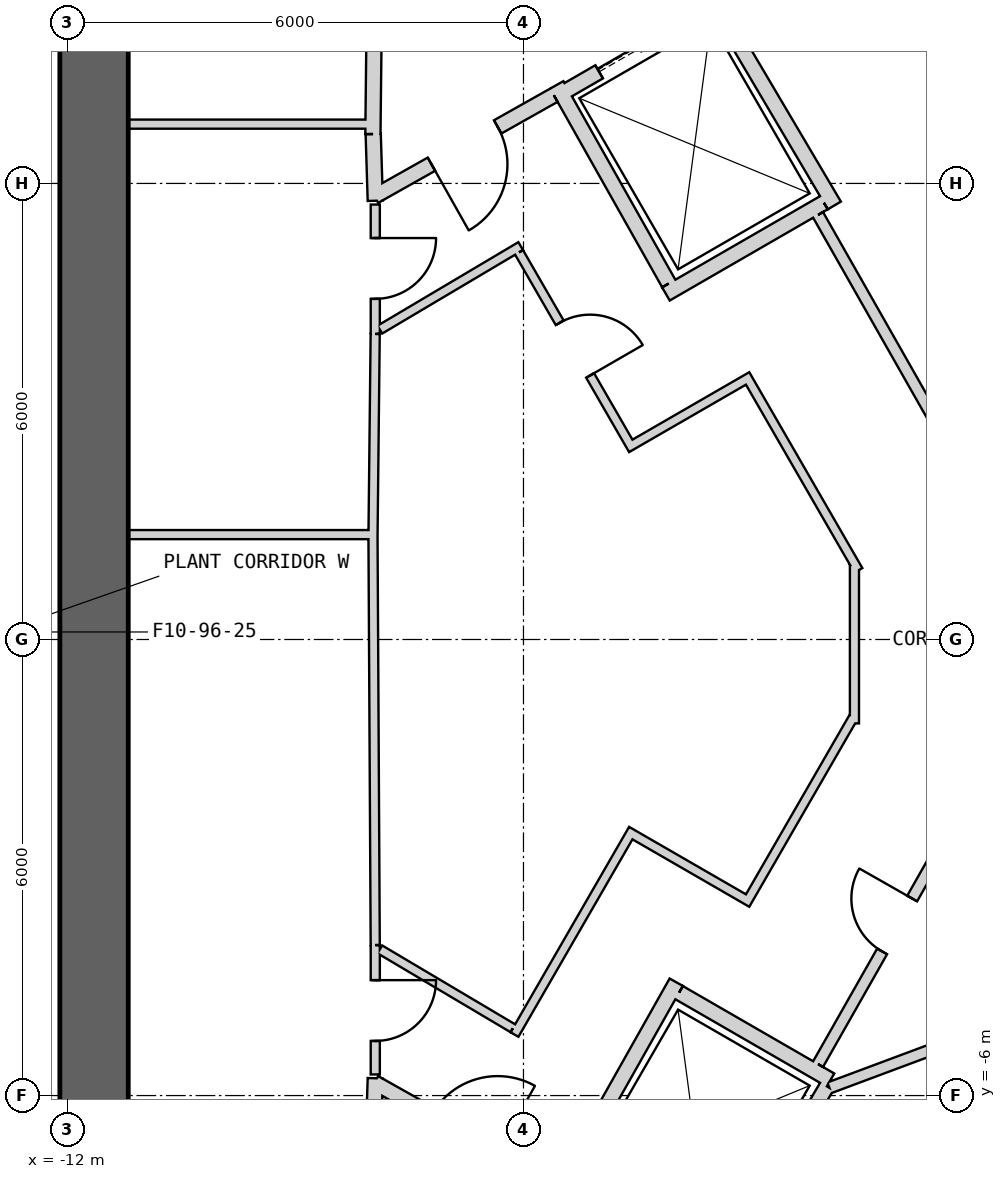
"""IFC4 building model, lengths in metres.
Left out: names, types, materials, properties, quantities, classifications, styles, units other than length and angle.
Written with IfcOpenShell. Run it as: python <this file> out.ifc"""

import sys

from ifc_helpers import new_model, si_unit, direction, frame, frame_2d, origin, place, context, subcontext, project, spatial, rectangle, extrude, element, fill, save


model = new_model("IFC4")
c1 = context("Model", 3, precision=1e-05, world=origin(), true_north=direction((0.0, 1.0)))
c2 = subcontext(c1, "Body", "Model", "MODEL_VIEW")
j1 = project(units=[si_unit("LENGTHUNIT", "METRE"), si_unit("PLANEANGLEUNIT", "RADIAN")], contexts=[c1])
p1 = place(None, origin())
s1 = spatial("IfcSite", under=j1, at=p1, CompositionType="ELEMENT")
p2 = place(p1, origin())
s2 = spatial("IfcBuilding", under=s1, at=p2, CompositionType="ELEMENT")
p3 = place(p2, frame((0.0, 0.0, 425.3)))
s3 = spatial("IfcBuildingStorey", under=s2, at=p3, CompositionType="ELEMENT", Elevation=425.3)
p4 = place(p3, frame((19.475, 2.208, 0.0), z_axis=(0.0, 0.0, 1.0), x_axis=(-0.866028369851, 0.499994862586, 0.0)))
e1 = element("IfcWall", 1, at=p4, inside=s3, PredefinedType="SHEAR", context=c2, shape_type="SweptSolid", body=[
    extrude(rectangle(XDim=31.523, YDim=0.9, at=frame_2d((15.762, 0.0))), origin(), (0.0, 0.0, 1.0), 5.0),
])
p5 = place(p4, frame((3.612, 0.0, 0.0)))
e2 = element("IfcOpeningElement", 2, at=p5, cuts=e1, PredefinedType="OPENING", context=c2, shape_type="SweptSolid", body=[
    extrude(rectangle(XDim=1.2, YDim=2.4, at=frame_2d((0.6, 1.2))), frame((0.0, 0.46, 0.0), z_axis=(0.0, -1.0, 0.0), x_axis=(1.0, 0.0, 0.0)), (0.0, 0.0, 1.0), 0.92),
])
p6 = place(p4, frame((26.712, 0.0, 0.0)))
e3 = element("IfcOpeningElement", 3, at=p6, cuts=e1, PredefinedType="OPENING", context=c2, shape_type="SweptSolid", body=[
    extrude(rectangle(XDim=1.2, YDim=2.4, at=frame_2d((0.6, 1.2))), frame((0.0, 0.46, 0.0), z_axis=(0.0, -1.0, 0.0), x_axis=(1.0, 0.0, 0.0)), (0.0, 0.0, 1.0), 0.92),
])
p7 = place(p3, frame((-11.65, 15.762, 0.0), z_axis=(0.0, 0.0, 1.0), x_axis=(0.0, -1.0, 0.0)))
e4 = element("IfcWall", 4, at=p7, inside=s3, PredefinedType="SHEAR", context=c2, shape_type="SweptSolid", body=[
    extrude(rectangle(XDim=31.523, YDim=0.9, at=frame_2d((15.762, 0.0))), origin(), (0.0, 0.0, 1.0), 5.0),
])
p8 = place(p7, frame((3.612, 0.0, 0.0)))
e5 = element("IfcOpeningElement", 5, at=p8, cuts=e4, PredefinedType="OPENING", context=c2, shape_type="SweptSolid", body=[
    extrude(rectangle(XDim=1.2, YDim=2.4, at=frame_2d((0.6, 1.2))), frame((0.0, 0.46, 0.0), z_axis=(0.0, -1.0, 0.0), x_axis=(1.0, 0.0, 0.0)), (0.0, 0.0, 1.0), 0.92),
])
p9 = place(p7, frame((26.712, 0.0, 0.0)))
e6 = element("IfcOpeningElement", 6, at=p9, cuts=e4, PredefinedType="OPENING", context=c2, shape_type="SweptSolid", body=[
    extrude(rectangle(XDim=1.2, YDim=2.4, at=frame_2d((0.6, 1.2))), frame((0.0, 0.46, 0.0), z_axis=(0.0, -1.0, 0.0), x_axis=(1.0, 0.0, 0.0)), (0.0, 0.0, 1.0), 0.92),
])
p10 = place(p3, frame((-7.825, -17.97, 0.0), z_axis=(0.0, 0.0, 1.0), x_axis=(0.866028369851, 0.499994862586, 0.0)))
e7 = element("IfcWall", 7, at=p10, inside=s3, PredefinedType="SHEAR", context=c2, shape_type="SweptSolid", body=[
    extrude(rectangle(XDim=31.523, YDim=0.9, at=frame_2d((15.762, 0.0))), origin(), (0.0, 0.0, 1.0), 5.0),
])
p11 = place(p10, frame((17.862, 0.0, 0.0)))
e8 = element("IfcOpeningElement", 8, at=p11, cuts=e7, PredefinedType="OPENING", context=c2, shape_type="SweptSolid", body=[
    extrude(rectangle(XDim=1.2, YDim=2.4, at=frame_2d((0.6, 1.2))), frame((0.0, 0.46, 0.0), z_axis=(0.0, -1.0, 0.0), x_axis=(1.0, 0.0, 0.0)), (0.0, 0.0, 1.0), 0.92),
])
p12 = place(p10, frame((20.562, 0.0, 0.0)))
e9 = element("IfcOpeningElement", 9, at=p12, cuts=e7, PredefinedType="OPENING", context=c2, shape_type="SweptSolid", body=[
    extrude(rectangle(XDim=1.2, YDim=2.4, at=frame_2d((0.6, 1.2))), frame((0.0, 0.46, 0.0), z_axis=(0.0, -1.0, 0.0), x_axis=(1.0, 0.0, 0.0)), (0.0, 0.0, 1.0), 0.92),
])
p13 = place(p10, frame((26.712, 0.0, 0.0)))
e10 = element("IfcOpeningElement", 10, at=p13, cuts=e7, PredefinedType="OPENING", context=c2, shape_type="SweptSolid", body=[
    extrude(rectangle(XDim=1.2, YDim=2.4, at=frame_2d((0.6, 1.2))), frame((0.0, 0.46, 0.0), z_axis=(0.0, -1.0, 0.0), x_axis=(1.0, 0.0, 0.0)), (0.0, 0.0, 1.0), 0.92),
])
p14 = place(p10, frame((3.612, 0.0, 0.0)))
e11 = element("IfcOpeningElement", 11, at=p14, cuts=e7, PredefinedType="OPENING", context=c2, shape_type="SweptSolid", body=[
    extrude(rectangle(XDim=1.2, YDim=2.4, at=frame_2d((0.6, 1.2))), frame((0.0, 0.46, 0.0), z_axis=(0.0, -1.0, 0.0), x_axis=(1.0, 0.0, 0.0)), (0.0, 0.0, 1.0), 0.92),
])
p15 = place(p3, frame((-5.524, 7.168, 0.0), z_axis=(0.0, 0.0, 1.0), x_axis=(0.866024647952, 0.500001309137, 0.0)))
e12 = element("IfcWall", 12, at=p15, inside=s3, PredefinedType="PLUMBINGWALL", context=c2, shape_type="SweptSolid", body=[
    extrude(rectangle(XDim=2.4, YDim=0.2, at=frame_2d((1.2, 0.0))), origin(), (0.0, 0.0, 1.0), 4.75),
])
p16 = place(p15, frame((0.6, 0.0, 0.0)))
e13 = element("IfcOpeningElement", 13, at=p16, cuts=e12, PredefinedType="OPENING", context=c2, shape_type="SweptSolid", body=[
    extrude(rectangle(XDim=1.2, YDim=2.4, at=frame_2d((0.6, 1.2))), frame((0.0, 0.11, 0.0), z_axis=(0.0, -1.0, 0.0), x_axis=(1.0, 0.0, 0.0)), (0.0, 0.0, 1.0), 0.22),
])
p17 = place(p3, frame((-3.538, 8.465, 0.0), z_axis=(0.0, 0.0, 1.0), x_axis=(0.508616218331, -0.860993346345, 0.0)))
e14 = element("IfcWall", 14, at=p17, inside=s3, PredefinedType="PLUMBINGWALL", context=c2, shape_type="SweptSolid", body=[
    extrude(rectangle(XDim=3.2, YDim=0.2, at=frame_2d((1.6, 0.0))), origin(), (0.0, 0.0, 1.0), 4.75),
])
p18 = place(p3, frame((-2.047, 5.746, 0.0), z_axis=(0.0, 0.0, 1.0), x_axis=(-0.866024647952, -0.500001309137, 0.0)))
e15 = element("IfcWall", 15, at=p18, inside=s3, PredefinedType="PLUMBINGWALL", context=c2, shape_type="SweptSolid", body=[
    extrude(rectangle(XDim=2.4, YDim=0.2, at=frame_2d((1.2, 0.0))), origin(), (0.0, 0.0, 1.0), 4.75),
])
p19 = place(p3, frame((-5.562, 7.296, 0.0), z_axis=(0.0, 0.0, 1.0), x_axis=(0.49134651263, -0.870964180966, 0.0)))
e16 = element("IfcWall", 16, at=p19, inside=s3, PredefinedType="PLUMBINGWALL", context=c2, shape_type="SweptSolid", body=[
    extrude(rectangle(XDim=3.0, YDim=0.2, at=frame_2d((1.5, 0.0))), origin(), (0.0, 0.0, 1.0), 4.75),
])
p20 = place(p3, frame((-3.953, -4.646, 0.0), z_axis=(0.0, 0.0, 1.0), x_axis=(0.866053019151, -0.499952165731, 0.0)))
e17 = element("IfcWall", 17, at=p20, inside=s3, PredefinedType="PLUMBINGWALL", context=c2, shape_type="SweptSolid", body=[
    extrude(rectangle(XDim=2.3, YDim=0.2, at=frame_2d((1.15, 0.0))), origin(), (0.0, 0.0, 1.0), 4.75),
])
p21 = place(p3, frame((-2.008, -5.878, 0.0), z_axis=(0.0, 0.0, 1.0), x_axis=(-0.508893526607, -0.860829471253, 0.0)))
e18 = element("IfcWall", 18, at=p21, inside=s3, PredefinedType="PLUMBINGWALL", context=c2, shape_type="SweptSolid", body=[
    extrude(rectangle(XDim=3.005, YDim=0.2, at=frame_2d((1.502, 0.0))), origin(), (0.0, 0.0, 1.0), 4.75),
])
p22 = place(p3, frame((-3.99, -4.509, 0.0), z_axis=(0.0, 0.0, 1.0), x_axis=(-0.491358283181, -0.870957540612, 0.0)))
e19 = element("IfcWall", 19, at=p22, inside=s3, PredefinedType="PLUMBINGWALL", context=c2, shape_type="SweptSolid", body=[
    extrude(rectangle(XDim=3.2, YDim=0.2, at=frame_2d((1.6, 0.0))), origin(), (0.0, 0.0, 1.0), 4.75),
])
p23 = place(p3, frame((-7.95, 6.78, 0.0), z_axis=(0.0, 0.0, 1.0), x_axis=(-1.0, 0.0, 0.0)))
e20 = element("IfcWall", 20, at=p23, inside=s3, PredefinedType="PARTITIONING", context=c2, shape_type="SweptSolid", body=[
    extrude(rectangle(XDim=3.25, YDim=0.12, at=frame_2d((1.625, 0.0))), origin(), (0.0, 0.0, 1.0), 4.75),
])
p24 = place(p3, frame((-7.981, 6.65, 0.0), z_axis=(0.0, 0.0, 1.0), x_axis=(0.011120469654, 0.999938165666, 0.0)))
e21 = element("IfcWall", 21, at=p24, inside=s3, PredefinedType="PARTITIONING", context=c2, shape_type="SweptSolid", body=[
    extrude(rectangle(XDim=2.7, YDim=0.2, at=frame_2d((1.35, 0.0))), origin(), (0.0, 0.0, 1.0), 4.75),
])
p25 = place(p3, frame((-7.95, 1.38, 0.0), z_axis=(0.0, 0.0, 1.0), x_axis=(-1.0, 0.0, 0.0)))
e22 = element("IfcWall", 22, at=p25, inside=s3, PredefinedType="PARTITIONING", context=c2, shape_type="SweptSolid", body=[
    extrude(rectangle(XDim=3.25, YDim=0.12, at=frame_2d((1.625, 0.0))), origin(), (0.0, 0.0, 1.0), 4.75),
])
p26 = place(p3, frame((-7.95, 5.772, 0.0), z_axis=(0.0, 0.0, 1.0), x_axis=(-0.030861509705, 0.999523670164, 0.0)))
e23 = element("IfcWall", 23, at=p26, inside=s3, PredefinedType="PARTITIONING", context=c2, shape_type="SweptSolid", body=[
    extrude(rectangle(XDim=0.878, YDim=0.2, at=frame_2d((0.439, 0.0))), origin(), (0.0, 0.0, 1.0), 4.75),
])
p27 = place(p3, frame((-7.951, 4.02, 0.0), z_axis=(0.0, 0.0, 1.0), x_axis=(-0.010879853406, -0.999940812643, 0.0)))
e24 = element("IfcWall", 24, at=p27, inside=s3, PredefinedType="PARTITIONING", context=c2, shape_type="SweptSolid", body=[
    extrude(rectangle(XDim=2.67, YDim=0.12, at=frame_2d((1.335, 0.0))), origin(), (0.0, 0.0, 1.0), 4.75),
])
p28 = place(p3, frame((-7.95, -5.722, 0.0), z_axis=(0.0, 0.0, 1.0), x_axis=(0.0, 1.0, 0.0)))
e25 = element("IfcWall", 25, at=p28, inside=s3, PredefinedType="PARTITIONING", context=c2, shape_type="SweptSolid", body=[
    extrude(rectangle(XDim=1.702, YDim=0.12, at=frame_2d((0.851, 0.0))), origin(), (0.0, 0.0, 1.0), 4.75),
])
p29 = place(p28, frame((0.441, 0.0, 0.0)))
e26 = element("IfcOpeningElement", 26, at=p29, cuts=e25, PredefinedType="OPENING", context=c2, shape_type="SweptSolid", body=[
    extrude(rectangle(XDim=0.8, YDim=2.1, at=frame_2d((0.4, 1.05))), frame((0.0, 0.07, 0.0), z_axis=(0.0, -1.0, 0.0), x_axis=(1.0, 0.0, 0.0)), (0.0, 0.0, 1.0), 0.14),
])
p30 = place(p3, frame((-7.95, 4.02, 0.0), z_axis=(0.0, 0.0, 1.0), x_axis=(0.0, 1.0, 0.0)))
e27 = element("IfcWall", 27, at=p30, inside=s3, PredefinedType="PARTITIONING", context=c2, shape_type="SweptSolid", body=[
    extrude(rectangle(XDim=1.702, YDim=0.12, at=frame_2d((0.851, 0.0))), origin(), (0.0, 0.0, 1.0), 4.75),
])
p31 = place(p30, frame((0.461, 0.0, 0.0)))
e28 = element("IfcOpeningElement", 28, at=p31, cuts=e27, PredefinedType="OPENING", context=c2, shape_type="SweptSolid", body=[
    extrude(rectangle(XDim=0.8, YDim=2.1, at=frame_2d((0.4, 1.05))), frame((0.0, 0.07, 0.0), z_axis=(0.0, -1.0, 0.0), x_axis=(1.0, 0.0, 0.0)), (0.0, 0.0, 1.0), 0.14),
])
p32 = place(p3, frame((-7.983, -6.85, 0.0), z_axis=(0.0, 0.0, 1.0), x_axis=(0.030803413295, 0.999525462272, 0.0)))
e29 = element("IfcWall", 29, at=p32, inside=s3, PredefinedType="PARTITIONING", context=c2, shape_type="SweptSolid", body=[
    extrude(rectangle(XDim=1.078, YDim=0.2, at=frame_2d((0.539, 0.0))), origin(), (0.0, 0.0, 1.0), 4.75),
])
p33 = place(p3, frame((-7.98, 1.35, 0.0), z_axis=(0.0, 0.0, 1.0), x_axis=(0.005500666883, -0.999984871217, 0.0)))
e30 = element("IfcWall", 30, at=p33, inside=s3, PredefinedType="PARTITIONING", context=c2, shape_type="SweptSolid", body=[
    extrude(rectangle(XDim=5.37, YDim=0.12, at=frame_2d((2.685, 0.0))), origin(), (0.0, 0.0, 1.0), 4.75),
])
p34 = place(p3, frame((5.159, 6.236, 0.0), z_axis=(0.0, 0.0, 1.0), x_axis=(-0.868105023632, 0.496380567654, 0.0)))
e31 = element("IfcWall", 31, at=p34, inside=s3, PredefinedType="PLUMBINGWALL", context=c2, shape_type="SweptSolid", body=[
    extrude(rectangle(XDim=7.072, YDim=0.15, at=frame_2d((3.536, 0.0))), origin(), (0.0, 0.0, 1.0), 4.75),
])
p35 = place(p3, frame((-5.6, 7.16, 0.0), z_axis=(0.0, 0.0, 1.0), x_axis=(-0.871337173459, -0.490684756385, 0.0)))
e32 = element("IfcWall", 32, at=p35, inside=s3, PredefinedType="PARTITIONING", context=c2, shape_type="SweptSolid", body=[
    extrude(rectangle(XDim=2.709, YDim=0.2, at=frame_2d((1.354, 0.0))), origin(), (0.0, 0.0, 1.0), 4.75),
])
p36 = place(p35, frame((0.848, 0.0, 0.0)))
e33 = element("IfcOpeningElement", 33, at=p36, cuts=e32, PredefinedType="OPENING", context=c2, shape_type="SweptSolid", body=[
    extrude(rectangle(XDim=1.0, YDim=2.1, at=frame_2d((0.5, 1.05))), frame((0.0, 0.11, 0.0), z_axis=(0.0, -1.0, 0.0), x_axis=(1.0, 0.0, 0.0)), (0.0, 0.0, 1.0), 0.22),
])
p37 = place(p3, frame((-7.961, -5.831, 0.0), z_axis=(0.0, 0.0, 1.0), x_axis=(0.871337173459, -0.490684756385, 0.0)))
e34 = element("IfcWall", 34, at=p37, inside=s3, PredefinedType="PARTITIONING", context=c2, shape_type="SweptSolid", body=[
    extrude(rectangle(XDim=2.709, YDim=0.2, at=frame_2d((1.354, 0.0))), origin(), (0.0, 0.0, 1.0), 4.75),
])
p38 = place(p37, frame((0.861, 0.0, 0.0)))
e35 = element("IfcOpeningElement", 35, at=p38, cuts=e34, PredefinedType="OPENING", context=c2, shape_type="SweptSolid", body=[
    extrude(rectangle(XDim=1.0, YDim=2.1, at=frame_2d((0.5, 1.05))), frame((0.0, 0.11, 0.0), z_axis=(0.0, -1.0, 0.0), x_axis=(1.0, 0.0, 0.0)), (0.0, 0.0, 1.0), 0.22),
])
p39 = place(p3, frame((-2.124, 5.586, 0.0), z_axis=(0.0, 0.0, 1.0), x_axis=(0.494084527552, -0.869413871314, 0.0)))
e36 = element("IfcWall", 36, at=p39, inside=s3, PredefinedType="PLUMBINGWALL", context=c2, shape_type="SweptSolid", body=[
    extrude(rectangle(XDim=4.188, YDim=0.15, at=frame_2d((2.094, 0.0))), origin(), (0.0, 0.0, 1.0), 4.75),
])
p40 = place(p3, frame((6.729, -2.65, 0.0), z_axis=(0.0, 0.0, 1.0), x_axis=(-0.936914282609, -0.349559189613, 0.0)))
e37 = element("IfcWall", 37, at=p40, inside=s3, PredefinedType="PLUMBINGWALL", context=c2, shape_type="SweptSolid", body=[
    extrude(rectangle(XDim=9.291, YDim=0.15, at=frame_2d((4.645, 0.0))), origin(), (0.0, 0.0, 1.0), 4.75),
])
p41 = place(p3, frame((0.02, -1.814, 0.0), z_axis=(0.0, 0.0, 1.0), x_axis=(-0.494047106341, -0.869435136578, 0.0)))
e38 = element("IfcWall", 38, at=p41, inside=s3, PredefinedType="PLUMBINGWALL", context=c2, shape_type="SweptSolid", body=[
    extrude(rectangle(XDim=4.339, YDim=0.15, at=frame_2d((2.17, 0.0))), origin(), (0.0, 0.0, 1.0), 4.75),
])
p42 = place(p41, frame((1.833, 0.0, 0.0)))
e39 = element("IfcOpeningElement", 39, at=p42, cuts=e38, PredefinedType="OPENING", context=c2, shape_type="SweptSolid", body=[
    extrude(rectangle(XDim=0.8, YDim=2.1, at=frame_2d((0.4, 1.05))), frame((0.0, 0.085, 0.0), z_axis=(0.0, -1.0, 0.0), x_axis=(1.0, 0.0, 0.0)), (0.0, 0.0, 1.0), 0.17),
])
p43 = place(p3, frame((-6.037, 5.176, 0.0), z_axis=(0.0, 0.0, 1.0), x_axis=(-0.860081621619, -0.510156450663, 0.0)))
e40 = element("IfcWall", 40, at=p43, inside=s3, PredefinedType="PARTITIONING", context=c2, shape_type="SweptSolid", body=[
    extrude(rectangle(XDim=2.155, YDim=0.12, at=frame_2d((1.077, 0.0))), origin(), (0.0, 0.0, 1.0), 4.75),
])
p44 = place(p3, frame((-4.558, 2.495, 0.0), z_axis=(0.0, 0.0, 1.0), x_axis=(-0.499990139034, 0.866031096941, 0.0)))
e41 = element("IfcWall", 41, at=p44, inside=s3, PredefinedType="PARTITIONING", context=c2, shape_type="SweptSolid", body=[
    extrude(rectangle(XDim=3.0, YDim=0.12, at=frame_2d((1.5, 0.0))), origin(), (0.0, 0.0, 1.0), 4.75),
])
p45 = place(p44, frame((1.13, 0.0, 0.0)))
e42 = element("IfcOpeningElement", 42, at=p45, cuts=e41, PredefinedType="OPENING", context=c2, shape_type="SweptSolid", body=[
    extrude(rectangle(XDim=0.8, YDim=2.1, at=frame_2d((0.4, 1.05))), frame((0.0, 0.07, 0.0), z_axis=(0.0, -1.0, 0.0), x_axis=(1.0, 0.0, 0.0)), (0.0, 0.0, 1.0), 0.14),
])
p46 = place(p3, frame((-2.999, 3.465, 0.0), z_axis=(0.0, 0.0, 1.0), x_axis=(-0.866059624469, -0.499940723351, 0.0)))
e43 = element("IfcWall", 43, at=p46, inside=s3, PredefinedType="PARTITIONING", context=c2, shape_type="SweptSolid", body=[
    extrude(rectangle(XDim=1.775, YDim=0.12, at=frame_2d((0.888, 0.0))), origin(), (0.0, 0.0, 1.0), 4.75),
])
p47 = place(p3, frame((-1.594, 0.91, 0.0), z_axis=(0.0, 0.0, 1.0), x_axis=(-0.49997412077, 0.866040344649, 0.0)))
e44 = element("IfcWall", 44, at=p47, inside=s3, PredefinedType="PARTITIONING", context=c2, shape_type="SweptSolid", body=[
    extrude(rectangle(XDim=2.855, YDim=0.12, at=frame_2d((1.428, 0.0))), origin(), (0.0, 0.0, 1.0), 4.75),
])
p48 = place(p3, frame((-1.646, -1.104, 0.0), z_axis=(0.0, 0.0, 1.0), x_axis=(0.0, 1.0, 0.0)))
e45 = element("IfcWall", 45, at=p48, inside=s3, PredefinedType="PARTITIONING", context=c2, shape_type="SweptSolid", body=[
    extrude(rectangle(XDim=2.085, YDim=0.12, at=frame_2d((1.043, 0.0))), origin(), (0.0, 0.0, 1.0), 4.75),
])
p49 = place(p3, frame((-3.081, -3.487, 0.0), z_axis=(0.0, 0.0, 1.0), x_axis=(0.499986688891, 0.86603308882, 0.0)))
e46 = element("IfcWall", 46, at=p49, inside=s3, PredefinedType="PARTITIONING", context=c2, shape_type="SweptSolid", body=[
    extrude(rectangle(XDim=2.853, YDim=0.12, at=frame_2d((1.426, 0.0))), origin(), (0.0, 0.0, 1.0), 4.75),
])
p50 = place(p3, frame((-4.64, -2.517, 0.0), z_axis=(0.0, 0.0, 1.0), x_axis=(0.866025242659, -0.500000279077, 0.0)))
e47 = element("IfcWall", 47, at=p50, inside=s3, PredefinedType="PARTITIONING", context=c2, shape_type="SweptSolid", body=[
    extrude(rectangle(XDim=1.775, YDim=0.12, at=frame_2d((0.887, 0.0))), origin(), (0.0, 0.0, 1.0), 4.75),
])
p51 = place(p3, frame((-6.118, -5.197, 0.0), z_axis=(0.0, 0.0, 1.0), x_axis=(0.499990139034, 0.866031096941, 0.0)))
e48 = element("IfcWall", 48, at=p51, inside=s3, PredefinedType="PARTITIONING", context=c2, shape_type="SweptSolid", body=[
    extrude(rectangle(XDim=3.0, YDim=0.12, at=frame_2d((1.5, 0.0))), origin(), (0.0, 0.0, 1.0), 4.75),
])
p52 = place(p3, frame((-7.89, -4.077, 0.0), z_axis=(0.0, 0.0, 1.0), x_axis=(0.860118010064, -0.510095097765, 0.0)))
e49 = element("IfcWall", 49, at=p52, inside=s3, PredefinedType="PARTITIONING", context=c2, shape_type="SweptSolid", body=[
    extrude(rectangle(XDim=2.035, YDim=0.12, at=frame_2d((1.017, 0.0))), origin(), (0.0, 0.0, 1.0), 4.75),
])
p53 = place(p36, origin())
e50 = element("IfcDoor", 50, at=p53, inside=s3, OperationType="SINGLE_SWING_RIGHT", PredefinedType="USERDEFINED", context=c2, shape_type="SweptSolid", body=[
    extrude(rectangle(XDim=1.0, YDim=2.1, at=frame_2d((0.5, 1.05))), frame((0.0, 0.025, 0.0), z_axis=(0.0, -1.0, 0.0), x_axis=(1.0, 0.0, 0.0)), (0.0, 0.0, 1.0), 0.05),
])
fill(e33, e50)
p54 = place(p16, origin())
e51 = element("IfcDoor", 51, at=p54, inside=s3, OperationType="SLIDING_TO_LEFT", PredefinedType="USERDEFINED", context=c2, shape_type="SweptSolid", body=[
    extrude(rectangle(XDim=1.2, YDim=2.4, at=frame_2d((0.6, 1.2))), frame((0.0, 0.025, 0.0), z_axis=(0.0, -1.0, 0.0), x_axis=(1.0, 0.0, 0.0)), (0.0, 0.0, 1.0), 0.05),
])
fill(e13, e51)
p55 = place(p42, origin())
e52 = element("IfcDoor", 52, at=p55, inside=s3, OperationType="SINGLE_SWING_LEFT", PredefinedType="USERDEFINED", context=c2, shape_type="SweptSolid", body=[
    extrude(rectangle(XDim=0.8, YDim=2.1, at=frame_2d((0.4, 1.05))), frame((0.0, 0.025, 0.0), z_axis=(0.0, -1.0, 0.0), x_axis=(1.0, 0.0, 0.0)), (0.0, 0.0, 1.0), 0.05),
])
fill(e39, e52)
p56 = place(p45, origin())
e53 = element("IfcDoor", 53, at=p56, inside=s3, OperationType="SINGLE_SWING_LEFT", PredefinedType="USERDEFINED", context=c2, shape_type="SweptSolid", body=[
    extrude(rectangle(XDim=0.8, YDim=2.1, at=frame_2d((0.4, 1.05))), frame((0.0, 0.025, 0.0), z_axis=(0.0, -1.0, 0.0), x_axis=(1.0, 0.0, 0.0)), (0.0, 0.0, 1.0), 0.05),
])
fill(e42, e53)
p57 = place(p31, origin())
e54 = element("IfcDoor", 54, at=p57, inside=s3, OperationType="SINGLE_SWING_RIGHT", PredefinedType="USERDEFINED", context=c2, shape_type="SweptSolid", body=[
    extrude(rectangle(XDim=0.8, YDim=2.1, at=frame_2d((0.4, 1.05))), frame((0.0, 0.025, 0.0), z_axis=(0.0, -1.0, 0.0), x_axis=(1.0, 0.0, 0.0)), (0.0, 0.0, 1.0), 0.05),
])
fill(e28, e54)
p58 = place(p29, origin())
e55 = element("IfcDoor", 55, at=p58, inside=s3, OperationType="SINGLE_SWING_RIGHT", PredefinedType="USERDEFINED", context=c2, shape_type="SweptSolid", body=[
    extrude(rectangle(XDim=0.8, YDim=2.1, at=frame_2d((0.4, 1.05))), frame((0.0, 0.025, 0.0), z_axis=(0.0, -1.0, 0.0), x_axis=(1.0, 0.0, 0.0)), (0.0, 0.0, 1.0), 0.05),
])
fill(e26, e55)
save(model, sys.argv[1])
